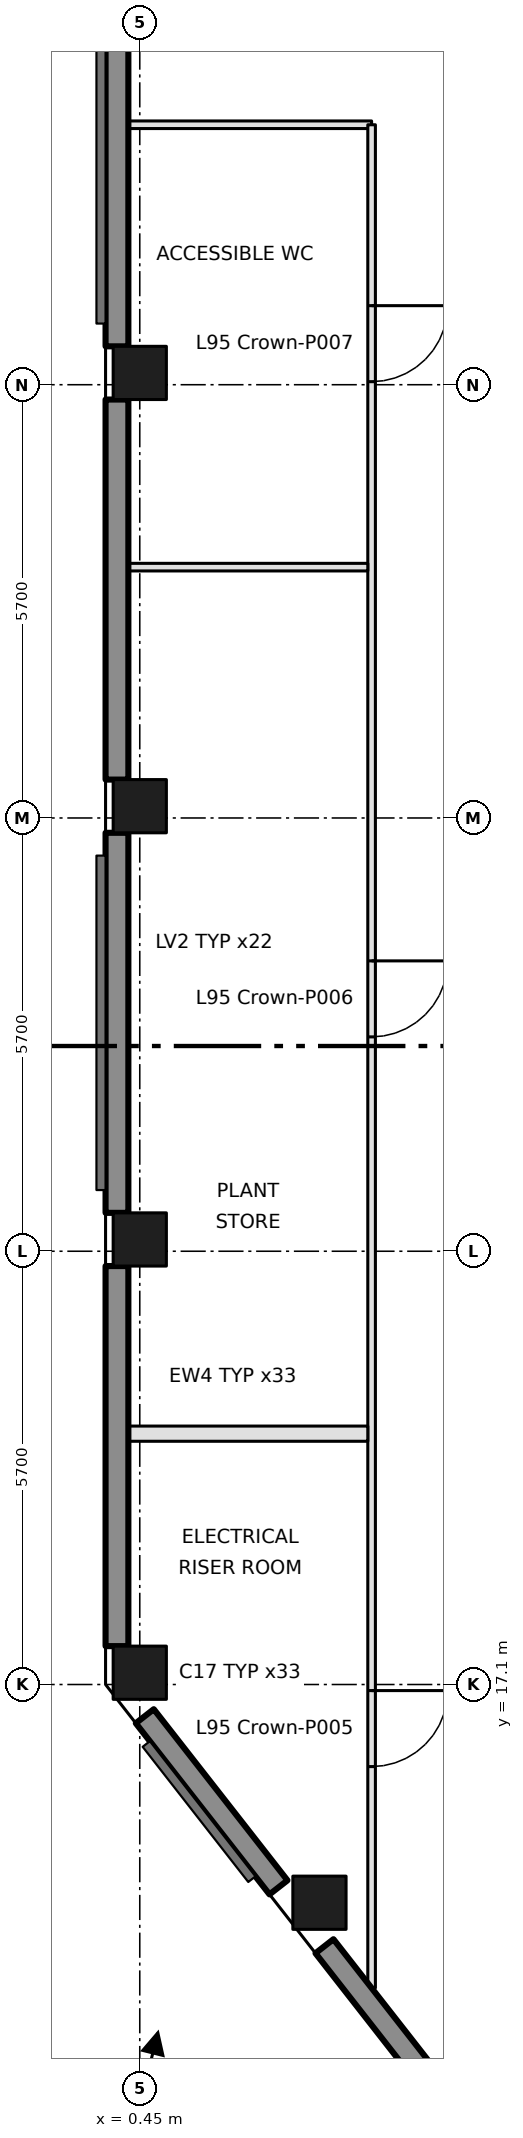
"""IFC4 building model, lengths in metres.
Left out: names, types, materials, properties, quantities, classifications, styles, units other than length and angle.
Written with IfcOpenShell. Run it as: python <this file> out.ifc"""

import sys

from ifc_helpers import new_model, si_unit, direction, frame, frame_2d, origin, origin_2d, place, context, subcontext, project, spatial, rectangle, extrude, element, fill, save


model = new_model("IFC4")
c1 = context("Model", 3, precision=1e-05, world=origin(), true_north=direction((0.0, 1.0)))
c2 = subcontext(c1, "Body", "Model", "MODEL_VIEW")
j1 = project(units=[si_unit("LENGTHUNIT", "METRE"), si_unit("PLANEANGLEUNIT", "RADIAN")], contexts=[c1])
p1 = place(None, origin())
s1 = spatial("IfcSite", under=j1, at=p1, CompositionType="ELEMENT")
p2 = place(p1, origin())
s2 = spatial("IfcBuilding", under=s1, at=p2, CompositionType="ELEMENT")
p3 = place(p2, frame((0.0, 0.0, 414.6)))
s3 = spatial("IfcBuildingStorey", under=s2, at=p3, CompositionType="ELEMENT", Elevation=414.6)
for number, where, z_axis, x_axis in (
    (1, (0.45, 17.255, 0.0), (0.0, 0.0, 1.0), (1.0, 0.0, 0.0)),
    (2, (0.45, 22.955, 0.0), (0.0, 0.0, 1.0), (1.0, 0.0, 0.0)),
    (3, (0.45, 28.655, 0.0), (0.0, 0.0, 1.0), (1.0, 0.0, 0.0)),
    (4, (0.45, 34.355, 0.0), (0.0, 0.0, 1.0), (1.0, 0.0, 0.0)),
    (5, (2.814, 14.229, 0.0), (0.0, 0.0, 1.0), (1.0, 0.0, 0.0)),
):
    element("IfcColumn", number, at=place(p3, frame(where, z_axis=z_axis, x_axis=x_axis)), inside=s3, PredefinedType="COLUMN", context=c2, shape_type="SweptSolid", body=[
        extrude(rectangle(XDim=0.7, YDim=0.7, at=origin_2d()), origin(), (0.0, 0.0, 1.0), 4.8),
    ])
p4 = place(p3, frame((0.3, 37.62, 0.0), z_axis=(0.0, 0.0, 1.0), x_axis=(1.0, 0.0, 0.0)))
e6 = element("IfcWall", 6, at=p4, inside=s3, PredefinedType="PARTITIONING", context=c2, shape_type="SweptSolid", body=[
    extrude(rectangle(XDim=3.2, YDim=0.1, at=frame_2d((1.6, 0.0))), origin(), (0.0, 0.0, 1.0), 4.35),
])
p5 = place(p3, frame((3.5, 37.62, 0.0), z_axis=(0.0, 0.0, 1.0), x_axis=(0.0, -1.0, 0.0)))
e7 = element("IfcWall", 7, at=p5, inside=s3, PredefinedType="PARTITIONING", context=c2, shape_type="SweptSolid", body=[
    extrude(rectangle(XDim=24.513, YDim=0.1, at=frame_2d((12.257, 0.0))), origin(), (0.0, 0.0, 1.0), 4.35),
])
p6 = place(p5, frame((20.6, 0.0, 0.0)))
e8 = element("IfcOpeningElement", 8, at=p6, cuts=e7, PredefinedType="OPENING", context=c2, shape_type="SweptSolid", body=[
    extrude(rectangle(XDim=1.0, YDim=2.1, at=frame_2d((0.5, 1.05))), frame((0.0, 0.06, 0.0), z_axis=(0.0, -1.0, 0.0), x_axis=(1.0, 0.0, 0.0)), (0.0, 0.0, 1.0), 0.12),
])
p7 = place(p5, frame((11.0, 0.0, 0.0)))
e9 = element("IfcOpeningElement", 9, at=p7, cuts=e7, PredefinedType="OPENING", context=c2, shape_type="SweptSolid", body=[
    extrude(rectangle(XDim=1.0, YDim=2.1, at=frame_2d((0.5, 1.05))), frame((0.0, 0.06, 0.0), z_axis=(0.0, -1.0, 0.0), x_axis=(1.0, 0.0, 0.0)), (0.0, 0.0, 1.0), 0.12),
])
p8 = place(p5, frame((2.38, 0.0, 0.0)))
e10 = element("IfcOpeningElement", 10, at=p8, cuts=e7, PredefinedType="OPENING", context=c2, shape_type="SweptSolid", body=[
    extrude(rectangle(XDim=1.0, YDim=2.1, at=frame_2d((0.5, 1.05))), frame((0.0, 0.06, 0.0), z_axis=(0.0, -1.0, 0.0), x_axis=(1.0, 0.0, 0.0)), (0.0, 0.0, 1.0), 0.12),
])
p9 = place(p3, frame((3.45, 20.4, 0.0), z_axis=(0.0, 0.0, 1.0), x_axis=(-1.0, 0.0, 0.0)))
e11 = element("IfcWall", 11, at=p9, inside=s3, PredefinedType="PARTITIONING", context=c2, shape_type="SweptSolid", body=[
    extrude(rectangle(XDim=3.15, YDim=0.2, at=frame_2d((1.575, 0.0))), origin(), (0.0, 0.0, 1.0), 4.35),
])
p10 = place(p3, frame((3.45, 31.8, 0.0), z_axis=(0.0, 0.0, 1.0), x_axis=(-1.0, 0.0, 0.0)))
e12 = element("IfcWall", 12, at=p10, inside=s3, PredefinedType="PARTITIONING", context=c2, shape_type="SweptSolid", body=[
    extrude(rectangle(XDim=3.15, YDim=0.1, at=frame_2d((1.575, 0.0))), origin(), (0.0, 0.0, 1.0), 4.35),
])
p11 = place(p3, frame((0.15, 39.364, 0.0), z_axis=(0.0, 0.0, 1.0), x_axis=(0.0, -1.0, 0.0)))
e13 = element("IfcWall", 13, at=p11, inside=s3, PredefinedType="SOLIDWALL", context=c2, shape_type="SweptSolid", body=[
    extrude(rectangle(XDim=4.659, YDim=0.3, at=frame_2d((2.33, 0.0))), origin(), (0.0, 0.0, 1.0), 3.7),
])
for number, where, z_axis, x_axis in (
    (14, (0.15, 34.005, 0.0), (0.0, 0.0, 1.0), (0.0, -1.0, 0.0)),
    (15, (0.15, 28.305, 0.0), (0.0, 0.0, 1.0), (0.0, -1.0, 0.0)),
    (16, (0.15, 22.605, 0.0), (0.0, 0.0, 1.0), (0.0, -1.0, 0.0)),
):
    element("IfcWall", number, at=place(p3, frame(where, z_axis=z_axis, x_axis=x_axis)), inside=s3, PredefinedType="SOLIDWALL", context=c2, shape_type="SweptSolid", body=[
        extrude(rectangle(XDim=5.0, YDim=0.3, at=frame_2d((2.5, 0.0))), origin(), (0.0, 0.0, 1.0), 3.7),
    ])
p12 = place(p3, frame((0.516, 16.683, 0.0), z_axis=(0.0, 0.0, 1.0), x_axis=(0.615483207854, -0.788149998953, 0.0)))
e17 = element("IfcWall", 17, at=p12, inside=s3, PredefinedType="SOLIDWALL", context=c2, shape_type="SweptSolid", body=[
    extrude(rectangle(XDim=2.858, YDim=0.3, at=frame_2d((1.429, 0.0))), origin(), (0.0, 0.0, 1.0), 3.7),
])
p13 = place(p3, frame((2.88, 13.657, 0.0), z_axis=(0.0, 0.0, 1.0), x_axis=(0.61578764214, -0.787912165021, 0.0)))
e18 = element("IfcWall", 18, at=p13, inside=s3, PredefinedType="SOLIDWALL", context=c2, shape_type="SweptSolid", body=[
    extrude(rectangle(XDim=4.718, YDim=0.3, at=frame_2d((2.359, 0.0))), origin(), (0.0, 0.0, 1.0), 3.7),
])
p14 = place(p6, origin())
e19 = element("IfcDoor", 19, at=p14, inside=s3, OperationType="SINGLE_SWING_LEFT", PredefinedType="DOOR", context=c2, shape_type="SweptSolid", body=[
    extrude(rectangle(XDim=1.0, YDim=2.1, at=frame_2d((0.5, 1.05))), frame((0.0, 0.025, 0.0), z_axis=(0.0, -1.0, 0.0), x_axis=(1.0, 0.0, 0.0)), (0.0, 0.0, 1.0), 0.05),
])
fill(e8, e19)
p15 = place(p7, origin())
e20 = element("IfcDoor", 20, at=p15, inside=s3, OperationType="SINGLE_SWING_LEFT", PredefinedType="DOOR", context=c2, shape_type="SweptSolid", body=[
    extrude(rectangle(XDim=1.0, YDim=2.1, at=frame_2d((0.5, 1.05))), frame((0.0, 0.025, 0.0), z_axis=(0.0, -1.0, 0.0), x_axis=(1.0, 0.0, 0.0)), (0.0, 0.0, 1.0), 0.05),
])
fill(e9, e20)
p16 = place(p8, origin())
e21 = element("IfcDoor", 21, at=p16, inside=s3, OperationType="SINGLE_SWING_LEFT", PredefinedType="DOOR", context=c2, shape_type="SweptSolid", body=[
    extrude(rectangle(XDim=1.0, YDim=2.1, at=frame_2d((0.5, 1.05))), frame((0.0, 0.025, 0.0), z_axis=(0.0, -1.0, 0.0), x_axis=(1.0, 0.0, 0.0)), (0.0, 0.0, 1.0), 0.05),
])
fill(e10, e21)
save(model, sys.argv[1])
